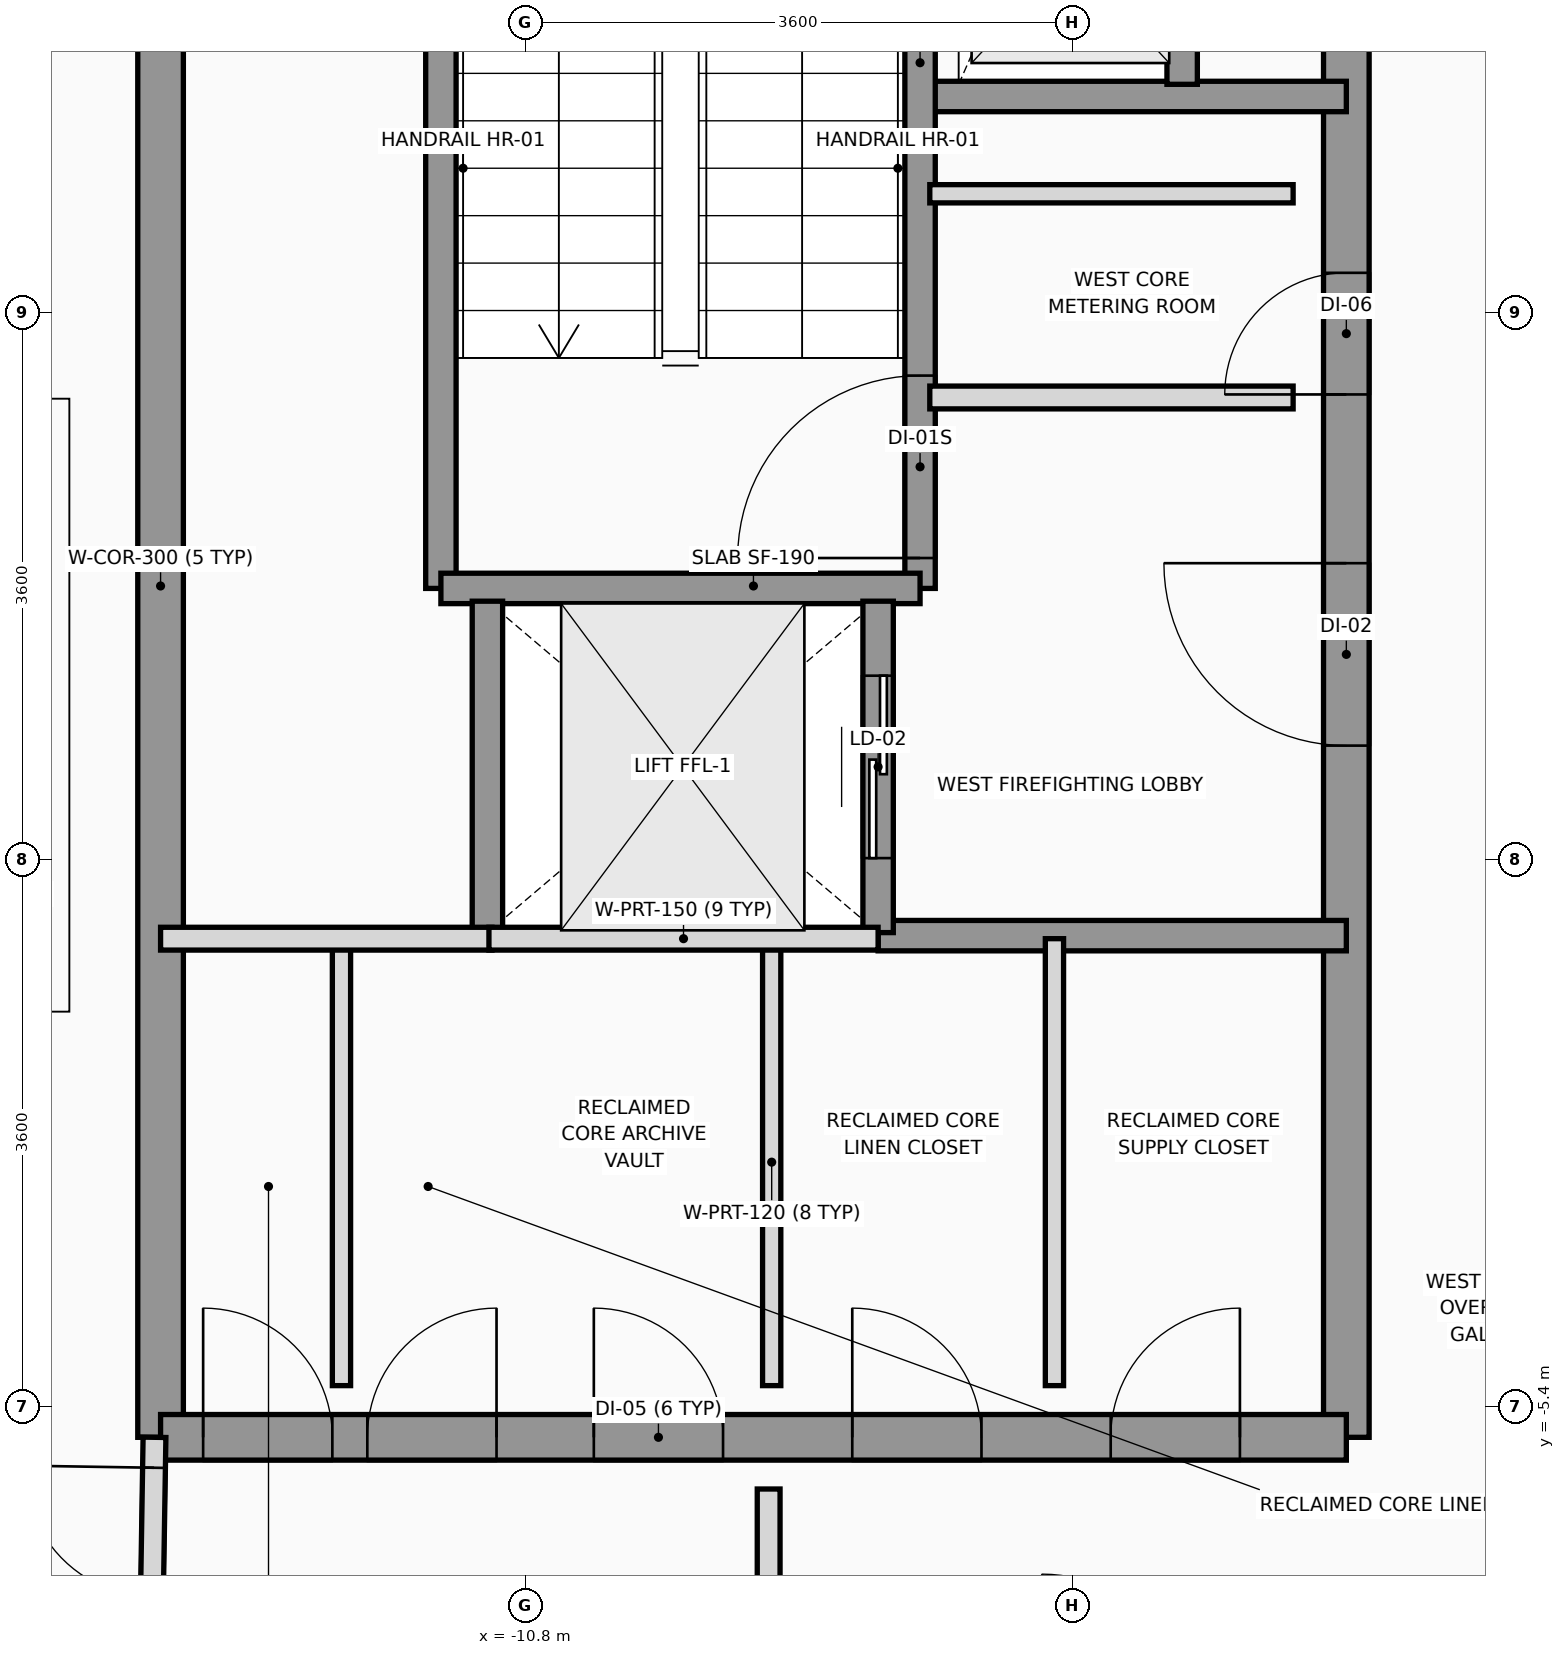
"""IFC4 building model, lengths in metres.
Left out: names, types, materials, properties, quantities, classifications, styles, units other than length and angle.
Written with IfcOpenShell. Run it as: python <this file> out.ifc"""

import sys

from ifc_helpers import new_model, si_unit, direction, frame, frame_2d, origin, place, context, subcontext, project, spatial, rectangle, extrude, source, transform, mapped, element, fill, save


model = new_model("IFC4")
c1 = context("Model", 3, precision=1e-05, world=origin(), true_north=direction((0.0, 1.0)))
c2 = subcontext(c1, "Body", "Model", "MODEL_VIEW")
j1 = project(units=[si_unit("LENGTHUNIT", "METRE"), si_unit("PLANEANGLEUNIT", "RADIAN")], contexts=[c1])
p1 = place(None, origin())
s1 = spatial("IfcSite", under=j1, at=p1, CompositionType="ELEMENT")
p2 = place(p1, origin())
s2 = spatial("IfcBuilding", under=s1, at=p2, CompositionType="ELEMENT")
p3 = place(p2, frame((0.0, 0.0, 223.6)))
s3 = spatial("IfcBuildingStorey", under=s2, at=p3, CompositionType="ELEMENT", Elevation=223.6)
p4 = place(p3, frame((-13.2, -5.6, 0.0), z_axis=(0.0, 0.0, 1.0), x_axis=(0.0, 1.0, 0.0)))
e1 = element("IfcWall", 1, at=p4, inside=s3, PredefinedType="SHEAR", context=c2, shape_type="SweptSolid", body=[
    extrude(rectangle(XDim=11.2, YDim=0.3, at=frame_2d((5.6, 0.0))), origin(), (0.0, 0.0, 1.0), 3.01),
])
p5 = place(p3, frame((-5.4, -5.6, 0.0), z_axis=(0.0, 0.0, 1.0), x_axis=(0.0, 1.0, 0.0)))
e2 = element("IfcWall", 2, at=p5, inside=s3, PredefinedType="SHEAR", context=c2, shape_type="SweptSolid", body=[
    extrude(rectangle(XDim=12.5, YDim=0.3, at=frame_2d((6.25, 0.0))), origin(), (0.0, 0.0, 1.0), 3.01),
])
p6 = place(p5, frame((4.55, 0.0, 0.0)))
e3 = element("IfcOpeningElement", 3, at=p6, cuts=e2, PredefinedType="OPENING", context=c2, shape_type="SweptSolid", body=[
    extrude(rectangle(XDim=1.2, YDim=2.2, at=frame_2d((0.6, 1.1))), frame((0.0, 0.16, 0.0), z_axis=(0.0, -1.0, 0.0), x_axis=(1.0, 0.0, 0.0)), (0.0, 0.0, 1.0), 0.32),
])
p7 = place(p5, frame((10.45, 0.0, 0.0)))
e4 = element("IfcOpeningElement", 4, at=p7, cuts=e2, PredefinedType="OPENING", context=c2, shape_type="SweptSolid", body=[
    extrude(rectangle(XDim=1.2, YDim=2.2, at=frame_2d((0.6, 1.1))), frame((0.0, 0.16, 0.0), z_axis=(0.0, -1.0, 0.0), x_axis=(1.0, 0.0, 0.0)), (0.0, 0.0, 1.0), 0.32),
])
p8 = place(p5, frame((6.86, 0.0, 0.0)))
e5 = element("IfcOpeningElement", 5, at=p8, cuts=e2, PredefinedType="OPENING", context=c2, shape_type="SweptSolid", body=[
    extrude(rectangle(XDim=0.8, YDim=2.1, at=frame_2d((0.4, 1.05))), frame((0.0, 0.16, 0.0), z_axis=(0.0, -1.0, 0.0), x_axis=(1.0, 0.0, 0.0)), (0.0, 0.0, 1.0), 0.32),
])
p9 = place(p3, frame((-13.2, -5.6, 0.0), z_axis=(0.0, 0.0, 1.0), x_axis=(1.0, 0.0, 0.0)))
e6 = element("IfcWall", 6, at=p9, inside=s3, PredefinedType="SHEAR", context=c2, shape_type="SweptSolid", body=[
    extrude(rectangle(XDim=7.8, YDim=0.3, at=frame_2d((3.9, 0.0))), origin(), (0.0, 0.0, 1.0), 3.01),
])
p10 = place(p9, frame((0.28, 0.0, 0.0)))
e7 = element("IfcOpeningElement", 7, at=p10, cuts=e6, PredefinedType="OPENING", context=c2, shape_type="SweptSolid", body=[
    extrude(rectangle(XDim=0.85, YDim=2.1, at=frame_2d((0.425, 1.05))), frame((0.0, 0.16, 0.0), z_axis=(0.0, -1.0, 0.0), x_axis=(1.0, 0.0, 0.0)), (0.0, 0.0, 1.0), 0.32),
])
p11 = place(p9, frame((1.36, 0.0, 0.0)))
e8 = element("IfcOpeningElement", 8, at=p11, cuts=e6, PredefinedType="OPENING", context=c2, shape_type="SweptSolid", body=[
    extrude(rectangle(XDim=0.85, YDim=2.1, at=frame_2d((0.425, 1.05))), frame((0.0, 0.16, 0.0), z_axis=(0.0, -1.0, 0.0), x_axis=(1.0, 0.0, 0.0)), (0.0, 0.0, 1.0), 0.32),
])
p12 = place(p9, frame((2.85, 0.0, 0.0)))
e9 = element("IfcOpeningElement", 9, at=p12, cuts=e6, PredefinedType="OPENING", context=c2, shape_type="SweptSolid", body=[
    extrude(rectangle(XDim=0.85, YDim=2.1, at=frame_2d((0.425, 1.05))), frame((0.0, 0.16, 0.0), z_axis=(0.0, -1.0, 0.0), x_axis=(1.0, 0.0, 0.0)), (0.0, 0.0, 1.0), 0.32),
])
p13 = place(p9, frame((4.55, 0.0, 0.0)))
e10 = element("IfcOpeningElement", 10, at=p13, cuts=e6, PredefinedType="OPENING", context=c2, shape_type="SweptSolid", body=[
    extrude(rectangle(XDim=0.85, YDim=2.1, at=frame_2d((0.425, 1.05))), frame((0.0, 0.16, 0.0), z_axis=(0.0, -1.0, 0.0), x_axis=(1.0, 0.0, 0.0)), (0.0, 0.0, 1.0), 0.32),
])
p14 = place(p9, frame((6.25, 0.0, 0.0)))
e11 = element("IfcOpeningElement", 11, at=p14, cuts=e6, PredefinedType="OPENING", context=c2, shape_type="SweptSolid", body=[
    extrude(rectangle(XDim=0.85, YDim=2.1, at=frame_2d((0.425, 1.05))), frame((0.0, 0.16, 0.0), z_axis=(0.0, -1.0, 0.0), x_axis=(1.0, 0.0, 0.0)), (0.0, 0.0, 1.0), 0.32),
])
p15 = place(p3, frame((-8.18, 3.22, 0.0), z_axis=(0.0, 0.0, 1.0), x_axis=(1.0, 0.0, 0.0)))
e12 = element("IfcWall", 12, at=p15, inside=s3, PredefinedType="SOLIDWALL", context=c2, shape_type="SweptSolid", body=[
    extrude(rectangle(XDim=2.78, YDim=0.2, at=frame_2d((1.39, 0.0))), origin(), (0.0, 0.0, 1.0), 3.01),
])
p16 = place(p3, frame((-8.48, -2.3, 0.0), z_axis=(0.0, 0.0, 1.0), x_axis=(1.0, 0.0, 0.0)))
e13 = element("IfcWall", 13, at=p16, inside=s3, PredefinedType="SOLIDWALL", context=c2, shape_type="SweptSolid", body=[
    extrude(rectangle(XDim=3.08, YDim=0.2, at=frame_2d((1.54, 0.0))), origin(), (0.0, 0.0, 1.0), 3.01),
])
p17 = place(p3, frame((-8.204, -0.016, 0.0), z_axis=(0.0, 0.0, 1.0), x_axis=(0.0, 1.0, 0.0)))
e14 = element("IfcWall", 14, at=p17, inside=s3, PredefinedType="SOLIDWALL", context=c2, shape_type="SweptSolid", body=[
    extrude(rectangle(XDim=6.916, YDim=0.2, at=frame_2d((3.458, 0.0))), origin(), (0.0, 0.0, 1.0), 3.01),
])
p18 = place(p17, frame((0.2, 0.0, 0.0)))
e15 = element("IfcOpeningElement", 15, at=p18, cuts=e14, PredefinedType="OPENING", context=c2, shape_type="SweptSolid", body=[
    extrude(rectangle(XDim=1.2, YDim=2.2, at=frame_2d((0.6, 1.1))), frame((0.0, 0.11, 0.0), z_axis=(0.0, -1.0, 0.0), x_axis=(1.0, 0.0, 0.0)), (0.0, 0.0, 1.0), 0.22),
])
p19 = place(p3, frame((-11.356, -0.016, 0.0), z_axis=(0.0, 0.0, 1.0), x_axis=(0.0, 1.0, 0.0)))
e16 = element("IfcWall", 16, at=p19, inside=s3, PredefinedType="SOLIDWALL", context=c2, shape_type="SweptSolid", body=[
    extrude(rectangle(XDim=6.916, YDim=0.2, at=frame_2d((3.458, 0.0))), origin(), (0.0, 0.0, 1.0), 3.01),
])
p20 = place(p3, frame((-11.356, -0.016, 0.0), z_axis=(0.0, 0.0, 1.0), x_axis=(1.0, 0.0, 0.0)))
e17 = element("IfcWall", 17, at=p20, inside=s3, PredefinedType="SOLIDWALL", context=c2, shape_type="SweptSolid", body=[
    extrude(rectangle(XDim=3.152, YDim=0.2, at=frame_2d((1.576, 0.0))), origin(), (0.0, 0.0, 1.0), 3.01),
])
p21 = place(p3, frame((-11.05, -2.28, 0.0), z_axis=(0.0, 0.0, 1.0), x_axis=(0.0, 1.0, 0.0)))
e18 = element("IfcWall", 18, at=p21, inside=s3, PredefinedType="SOLIDWALL", context=c2, shape_type="SweptSolid", body=[
    extrude(rectangle(XDim=2.18, YDim=0.2, at=frame_2d((1.09, 0.0))), origin(), (0.0, 0.0, 1.0), 3.01),
])
p22 = place(p3, frame((-8.48, -2.28, 0.0), z_axis=(0.0, 0.0, 1.0), x_axis=(0.0, 1.0, 0.0)))
e19 = element("IfcWall", 19, at=p22, inside=s3, PredefinedType="SOLIDWALL", context=c2, shape_type="SweptSolid", body=[
    extrude(rectangle(XDim=2.18, YDim=0.2, at=frame_2d((1.09, 0.0))), origin(), (0.0, 0.0, 1.0), 3.01),
])
p23 = place(p22, frame((0.49, 0.0, 0.0)))
e20 = element("IfcOpeningElement", 20, at=p23, cuts=e19, PredefinedType="OPENING", context=c2, shape_type="SweptSolid", body=[
    extrude(rectangle(XDim=1.2, YDim=2.2, at=frame_2d((0.6, 1.1))), frame((0.0, 0.11, 0.0), z_axis=(0.0, -1.0, 0.0), x_axis=(1.0, 0.0, 0.0)), (0.0, 0.0, 1.0), 0.22),
])
p24 = place(p3, frame((-6.48, 3.3, 0.0), z_axis=(0.0, 0.0, 1.0), x_axis=(0.0, 1.0, 0.0)))
e21 = element("IfcWall", 21, at=p24, inside=s3, PredefinedType="SOLIDWALL", context=c2, shape_type="SweptSolid", body=[
    extrude(rectangle(XDim=1.68, YDim=0.2, at=frame_2d((0.84, 0.0))), origin(), (0.0, 0.0, 1.0), 3.01),
])
p25 = place(p24, frame((0.29, 0.0, 0.0)))
e22 = element("IfcOpeningElement", 22, at=p25, cuts=e21, PredefinedType="OPENING", context=c2, shape_type="SweptSolid", body=[
    extrude(rectangle(XDim=1.1, YDim=2.2, at=frame_2d((0.55, 1.1))), frame((0.0, 0.11, 0.0), z_axis=(0.0, -1.0, 0.0), x_axis=(1.0, 0.0, 0.0)), (0.0, 0.0, 1.0), 0.22),
])
p26 = place(p3, frame((-8.14, 1.24, 0.0), z_axis=(0.0, 0.0, 1.0), x_axis=(1.0, 0.0, 0.0)))
e23 = element("IfcWall", 23, at=p26, inside=s3, PredefinedType="PARTITIONING", context=c2, shape_type="SweptSolid", body=[
    extrude(rectangle(XDim=2.39, YDim=0.15, at=frame_2d((1.195, 0.0))), origin(), (0.0, 0.0, 1.0), 3.01),
])
p27 = place(p3, frame((-8.14, 2.58, 0.0), z_axis=(0.0, 0.0, 1.0), x_axis=(1.0, 0.0, 0.0)))
e24 = element("IfcWall", 24, at=p27, inside=s3, PredefinedType="PARTITIONING", context=c2, shape_type="SweptSolid", body=[
    extrude(rectangle(XDim=2.39, YDim=0.12, at=frame_2d((1.195, 0.0))), origin(), (0.0, 0.0, 1.0), 3.01),
])
p28 = place(p3, frame((-12.01, -5.26, 0.0), z_axis=(0.0, 0.0, 1.0), x_axis=(0.0, 1.0, 0.0)))
e25 = element("IfcWall", 25, at=p28, inside=s3, PredefinedType="PARTITIONING", context=c2, shape_type="SweptSolid", body=[
    extrude(rectangle(XDim=2.94, YDim=0.12, at=frame_2d((1.47, 0.0))), origin(), (0.0, 0.0, 1.0), 3.01),
])
p29 = place(p3, frame((-13.2, -2.32, 0.0), z_axis=(0.0, 0.0, 1.0), x_axis=(1.0, 0.0, 0.0)))
e26 = element("IfcWall", 26, at=p29, inside=s3, PredefinedType="PARTITIONING", context=c2, shape_type="SweptSolid", body=[
    extrude(rectangle(XDim=2.18, YDim=0.15, at=frame_2d((1.09, 0.0))), origin(), (0.0, 0.0, 1.0), 3.01),
])
for number, where, z_axis, x_axis in (
    (27, (-9.18, -5.26, 0.0), (0.0, 0.0, 1.0), (0.0, 1.0, 0.0)),
    (28, (-7.32, -5.26, 0.0), (0.0, 0.0, 1.0), (0.0, 1.0, 0.0)),
):
    element("IfcWall", number, at=place(p3, frame(where, z_axis=z_axis, x_axis=x_axis)), inside=s3, PredefinedType="PARTITIONING", context=c2, shape_type="SweptSolid", body=[
        extrude(rectangle(XDim=2.94, YDim=0.12, at=frame_2d((1.47, 0.0))), origin(), (0.0, 0.0, 1.0), 3.01),
    ])
p30 = place(p3, frame((-11.04, -2.32, 0.0), z_axis=(0.0, 0.0, 1.0), x_axis=(1.0, 0.0, 0.0)))
e29 = element("IfcWall", 29, at=p30, inside=s3, PredefinedType="PARTITIONING", context=c2, shape_type="SweptSolid", body=[
    extrude(rectangle(XDim=2.56, YDim=0.15, at=frame_2d((1.28, 0.0))), origin(), (0.0, 0.0, 1.0), 3.01),
])
p31 = place(p3, frame((-9.2, -10.28, 0.0), z_axis=(0.0, 0.0, 1.0), x_axis=(0.0, 1.0, 0.0)))
e30 = element("IfcWall", 30, at=p31, inside=s3, PredefinedType="PARTITIONING", context=c2, shape_type="SweptSolid", body=[
    extrude(rectangle(XDim=4.34, YDim=0.15, at=frame_2d((2.17, 0.0))), origin(), (0.0, 0.0, 1.0), 2.61),
])
p32 = place(p3, frame((-13.26, -6.85, 0.0), z_axis=(0.0, 0.0, 1.0), x_axis=(0.016013571389, 0.999871774545, 0.0)))
e31 = element("IfcWall", 31, at=p32, inside=s3, PredefinedType="PARTITIONING", context=c2, shape_type="SweptSolid", body=[
    extrude(rectangle(XDim=1.25, YDim=0.15, at=frame_2d((0.625, 0.0))), origin(), (0.0, 0.0, 1.0), 3.01),
])
p33 = place(p32, frame((0.2, 0.0, 0.0)))
e32 = element("IfcOpeningElement", 32, at=p33, cuts=e31, PredefinedType="OPENING", context=c2, shape_type="SweptSolid", body=[
    extrude(rectangle(XDim=0.85, YDim=2.1, at=frame_2d((0.425, 1.05))), frame((0.0, 0.085, 0.0), z_axis=(0.0, -1.0, 0.0), x_axis=(1.0, 0.0, 0.0)), (0.0, 0.0, 1.0), 0.17),
])
m1 = source(origin(), c2, "Body", "SweptSolid", [
    extrude(rectangle(XDim=1.2, YDim=2.2, at=frame_2d((0.6, 1.1))), frame((0.0, 0.025, 0.0), z_axis=(0.0, -1.0, 0.0), x_axis=(1.0, 0.0, 0.0)), (0.0, 0.0, 1.0), 0.05),
])
p34 = place(p18, origin())
e33 = element("IfcDoor", 33, at=p34, inside=s3, OperationType="SINGLE_SWING_LEFT", PredefinedType="DOOR", context=c2, shape_type="MappedRepresentation", body=[
    mapped(m1, transform((0.0, 0.0, 0.0), x_axis=(1.0, 0.0, 0.0), y_axis=(0.0, 1.0, 0.0), z_axis=(0.0, 0.0, 1.0), scale=1.0)),
])
fill(e15, e33)
p35 = place(p6, origin())
e34 = element("IfcDoor", 34, at=p35, inside=s3, OperationType="SINGLE_SWING_RIGHT", PredefinedType="DOOR", context=c2, shape_type="MappedRepresentation", body=[
    mapped(m1, transform((0.0, 0.0, 0.0), x_axis=(1.0, 0.0, 0.0), y_axis=(0.0, 1.0, 0.0), z_axis=(0.0, 0.0, 1.0), scale=1.0)),
])
fill(e3, e34)
m2 = source(origin(), c2, "Body", "SweptSolid", [
    extrude(rectangle(XDim=0.8, YDim=2.1, at=frame_2d((0.4, 1.05))), frame((0.0, 0.025, 0.0), z_axis=(0.0, -1.0, 0.0), x_axis=(1.0, 0.0, 0.0)), (0.0, 0.0, 1.0), 0.05),
])
p36 = place(p8, origin())
e35 = element("IfcDoor", 35, at=p36, inside=s3, OperationType="SINGLE_SWING_LEFT", PredefinedType="DOOR", context=c2, shape_type="MappedRepresentation", body=[
    mapped(m2, transform((0.0, 0.0, 0.0), x_axis=(1.0, 0.0, 0.0), y_axis=(0.0, 1.0, 0.0), z_axis=(0.0, 0.0, 1.0), scale=1.0)),
])
fill(e5, e35)
m3 = source(origin(), c2, "Body", "SweptSolid", [
    extrude(rectangle(XDim=0.85, YDim=2.1, at=frame_2d((0.425, 1.05))), frame((0.0, 0.025, 0.0), z_axis=(0.0, -1.0, 0.0), x_axis=(1.0, 0.0, 0.0)), (0.0, 0.0, 1.0), 0.05),
])
p37 = place(p10, origin())
e36 = element("IfcDoor", 36, at=p37, inside=s3, OperationType="SINGLE_SWING_LEFT", PredefinedType="DOOR", context=c2, shape_type="MappedRepresentation", body=[
    mapped(m3, transform((0.0, 0.0, 0.0), x_axis=(1.0, 0.0, 0.0), y_axis=(0.0, 1.0, 0.0), z_axis=(0.0, 0.0, 1.0), scale=1.0)),
])
fill(e7, e36)
p38 = place(p11, origin())
e37 = element("IfcDoor", 37, at=p38, inside=s3, OperationType="SINGLE_SWING_RIGHT", PredefinedType="DOOR", context=c2, shape_type="MappedRepresentation", body=[
    mapped(m3, transform((0.0, 0.0, 0.0), x_axis=(1.0, 0.0, 0.0), y_axis=(0.0, 1.0, 0.0), z_axis=(0.0, 0.0, 1.0), scale=1.0)),
])
fill(e8, e37)
p39 = place(p12, origin())
e38 = element("IfcDoor", 38, at=p39, inside=s3, OperationType="SINGLE_SWING_LEFT", PredefinedType="DOOR", context=c2, shape_type="MappedRepresentation", body=[
    mapped(m3, transform((0.0, 0.0, 0.0), x_axis=(1.0, 0.0, 0.0), y_axis=(0.0, 1.0, 0.0), z_axis=(0.0, 0.0, 1.0), scale=1.0)),
])
fill(e9, e38)
p40 = place(p13, origin())
e39 = element("IfcDoor", 39, at=p40, inside=s3, OperationType="SINGLE_SWING_LEFT", PredefinedType="DOOR", context=c2, shape_type="MappedRepresentation", body=[
    mapped(m3, transform((0.0, 0.0, 0.0), x_axis=(1.0, 0.0, 0.0), y_axis=(0.0, 1.0, 0.0), z_axis=(0.0, 0.0, 1.0), scale=1.0)),
])
fill(e10, e39)
p41 = place(p14, origin())
e40 = element("IfcDoor", 40, at=p41, inside=s3, OperationType="SINGLE_SWING_RIGHT", PredefinedType="DOOR", context=c2, shape_type="MappedRepresentation", body=[
    mapped(m3, transform((0.0, 0.0, 0.0), x_axis=(1.0, 0.0, 0.0), y_axis=(0.0, 1.0, 0.0), z_axis=(0.0, 0.0, 1.0), scale=1.0)),
])
fill(e11, e40)
p42 = place(p23, origin())
e41 = element("IfcDoor", 41, at=p42, inside=s3, OperationType="SLIDING_TO_RIGHT", PredefinedType="DOOR", context=c2, shape_type="MappedRepresentation", body=[
    mapped(m1, transform((0.0, 0.0, 0.0), x_axis=(1.0, 0.0, 0.0), y_axis=(0.0, 1.0, 0.0), z_axis=(0.0, 0.0, 1.0), scale=1.0)),
])
fill(e20, e41)
p43 = place(p33, origin())
e42 = element("IfcDoor", 42, at=p43, inside=s3, OperationType="SINGLE_SWING_RIGHT", PredefinedType="DOOR", context=c2, shape_type="MappedRepresentation", body=[
    mapped(m3, transform((0.0, 0.0, 0.0), x_axis=(1.0, 0.0, 0.0), y_axis=(0.0, 1.0, 0.0), z_axis=(0.0, 0.0, 1.0), scale=1.0)),
])
fill(e32, e42)
save(model, sys.argv[1])
